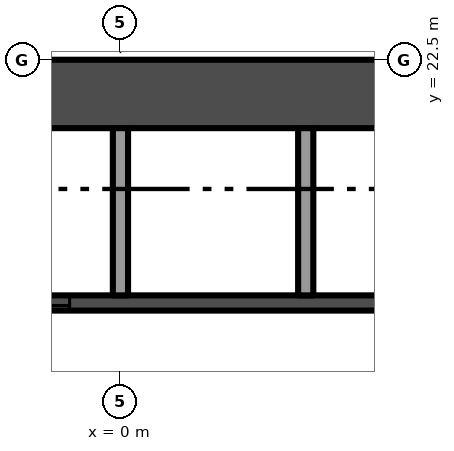
"""IFC4 building model, lengths in metres.
Left out: names, types, materials, properties, quantities, classifications, styles, units other than length and angle.
Written with IfcOpenShell. Run it as: python <this file> out.ifc"""

import sys

from ifc_helpers import new_model, si_unit, direction, frame, frame_2d, origin, place, context, subcontext, project, spatial, rectangle, extrude, element, fill, save


model = new_model("IFC4")
c1 = context("Model", 3, precision=1e-05, world=origin(), true_north=direction((0.0, 1.0)))
c2 = subcontext(c1, "Body", "Model", "MODEL_VIEW")
j1 = project(units=[si_unit("LENGTHUNIT", "METRE"), si_unit("PLANEANGLEUNIT", "RADIAN")], contexts=[c1])
p1 = place(None, origin())
s1 = spatial("IfcSite", under=j1, at=p1, CompositionType="ELEMENT")
p2 = place(p1, origin())
s2 = spatial("IfcBuilding", under=s1, at=p2, CompositionType="ELEMENT")
p3 = place(p2, frame((0.0, 0.0, 99.8)))
s3 = spatial("IfcBuildingStorey", under=s2, at=p3, CompositionType="ELEMENT", Elevation=99.8)
p4 = place(p3, frame((13.5, 22.05, -0.3), z_axis=(0.0, 0.0, 1.0), x_axis=(-1.0, 0.0, 0.0)))
e1 = element("IfcWall", 1, at=p4, inside=s3, PredefinedType="SHEAR", context=c2, shape_type="SweptSolid", body=[
    extrude(rectangle(XDim=27.0, YDim=0.9, at=frame_2d((13.5, 0.0))), origin(), (0.0, 0.0, 1.0), 3.8),
])
p5 = place(p3, frame((-9.85, 19.3, 0.0), z_axis=(0.0, 0.0, 1.0), x_axis=(1.0, 0.0, 0.0)))
e2 = element("IfcWall", 2, at=p5, inside=s3, PredefinedType="SHEAR", context=c2, shape_type="SweptSolid", body=[
    extrude(rectangle(XDim=19.7, YDim=0.2, at=frame_2d((9.85, 0.0))), origin(), (0.0, 0.0, 1.0), 3.5),
])
p6 = place(p5, frame((0.769, 0.0, 0.0)))
e3 = element("IfcOpeningElement", 3, at=p6, cuts=e2, PredefinedType="OPENING", context=c2, shape_type="SweptSolid", body=[
    extrude(rectangle(XDim=1.1, YDim=2.1, at=frame_2d((0.55, 1.05))), frame((0.0, 0.11, 0.0), z_axis=(0.0, -1.0, 0.0), x_axis=(1.0, 0.0, 0.0)), (0.0, 0.0, 1.0), 0.22),
])
p7 = place(p5, frame((3.206, 0.0, 0.0)))
e4 = element("IfcOpeningElement", 4, at=p7, cuts=e2, PredefinedType="OPENING", context=c2, shape_type="SweptSolid", body=[
    extrude(rectangle(XDim=1.1, YDim=2.1, at=frame_2d((0.55, 1.05))), frame((0.0, 0.11, 0.0), z_axis=(0.0, -1.0, 0.0), x_axis=(1.0, 0.0, 0.0)), (0.0, 0.0, 1.0), 0.22),
])
p8 = place(p5, frame((5.644, 0.0, 0.0)))
e5 = element("IfcOpeningElement", 5, at=p8, cuts=e2, PredefinedType="OPENING", context=c2, shape_type="SweptSolid", body=[
    extrude(rectangle(XDim=1.1, YDim=2.1, at=frame_2d((0.55, 1.05))), frame((0.0, 0.11, 0.0), z_axis=(0.0, -1.0, 0.0), x_axis=(1.0, 0.0, 0.0)), (0.0, 0.0, 1.0), 0.22),
])
p9 = place(p5, frame((8.081, 0.0, 0.0)))
e6 = element("IfcOpeningElement", 6, at=p9, cuts=e2, PredefinedType="OPENING", context=c2, shape_type="SweptSolid", body=[
    extrude(rectangle(XDim=1.1, YDim=2.1, at=frame_2d((0.55, 1.05))), frame((0.0, 0.11, 0.0), z_axis=(0.0, -1.0, 0.0), x_axis=(1.0, 0.0, 0.0)), (0.0, 0.0, 1.0), 0.22),
])
for number, where, z_axis, x_axis in (
    (7, (0.0, 19.4, 0.0), (0.0, 0.0, 1.0), (0.0, 1.0, 0.0)),
    (8, (2.438, 19.4, 0.0), (0.0, 0.0, 1.0), (0.0, 1.0, 0.0)),
):
    element("IfcWall", number, at=place(p3, frame(where, z_axis=z_axis, x_axis=x_axis)), inside=s3, PredefinedType="PARTITIONING", context=c2, shape_type="SweptSolid", body=[
        extrude(rectangle(XDim=2.2, YDim=0.2, at=frame_2d((1.1, 0.0))), origin(), (0.0, 0.0, 1.0), 3.5),
    ])
p10 = place(p9, origin())
e9 = element("IfcDoor", 9, at=p10, inside=s3, OperationType="SLIDING_TO_LEFT", PredefinedType="DOOR", context=c2, shape_type="SweptSolid", body=[
    extrude(rectangle(XDim=1.1, YDim=2.1, at=frame_2d((0.55, 1.05))), frame((0.0, 0.025, 0.0), z_axis=(0.0, -1.0, 0.0), x_axis=(1.0, 0.0, 0.0)), (0.0, 0.0, 1.0), 0.05),
])
fill(e6, e9)
save(model, sys.argv[1])
